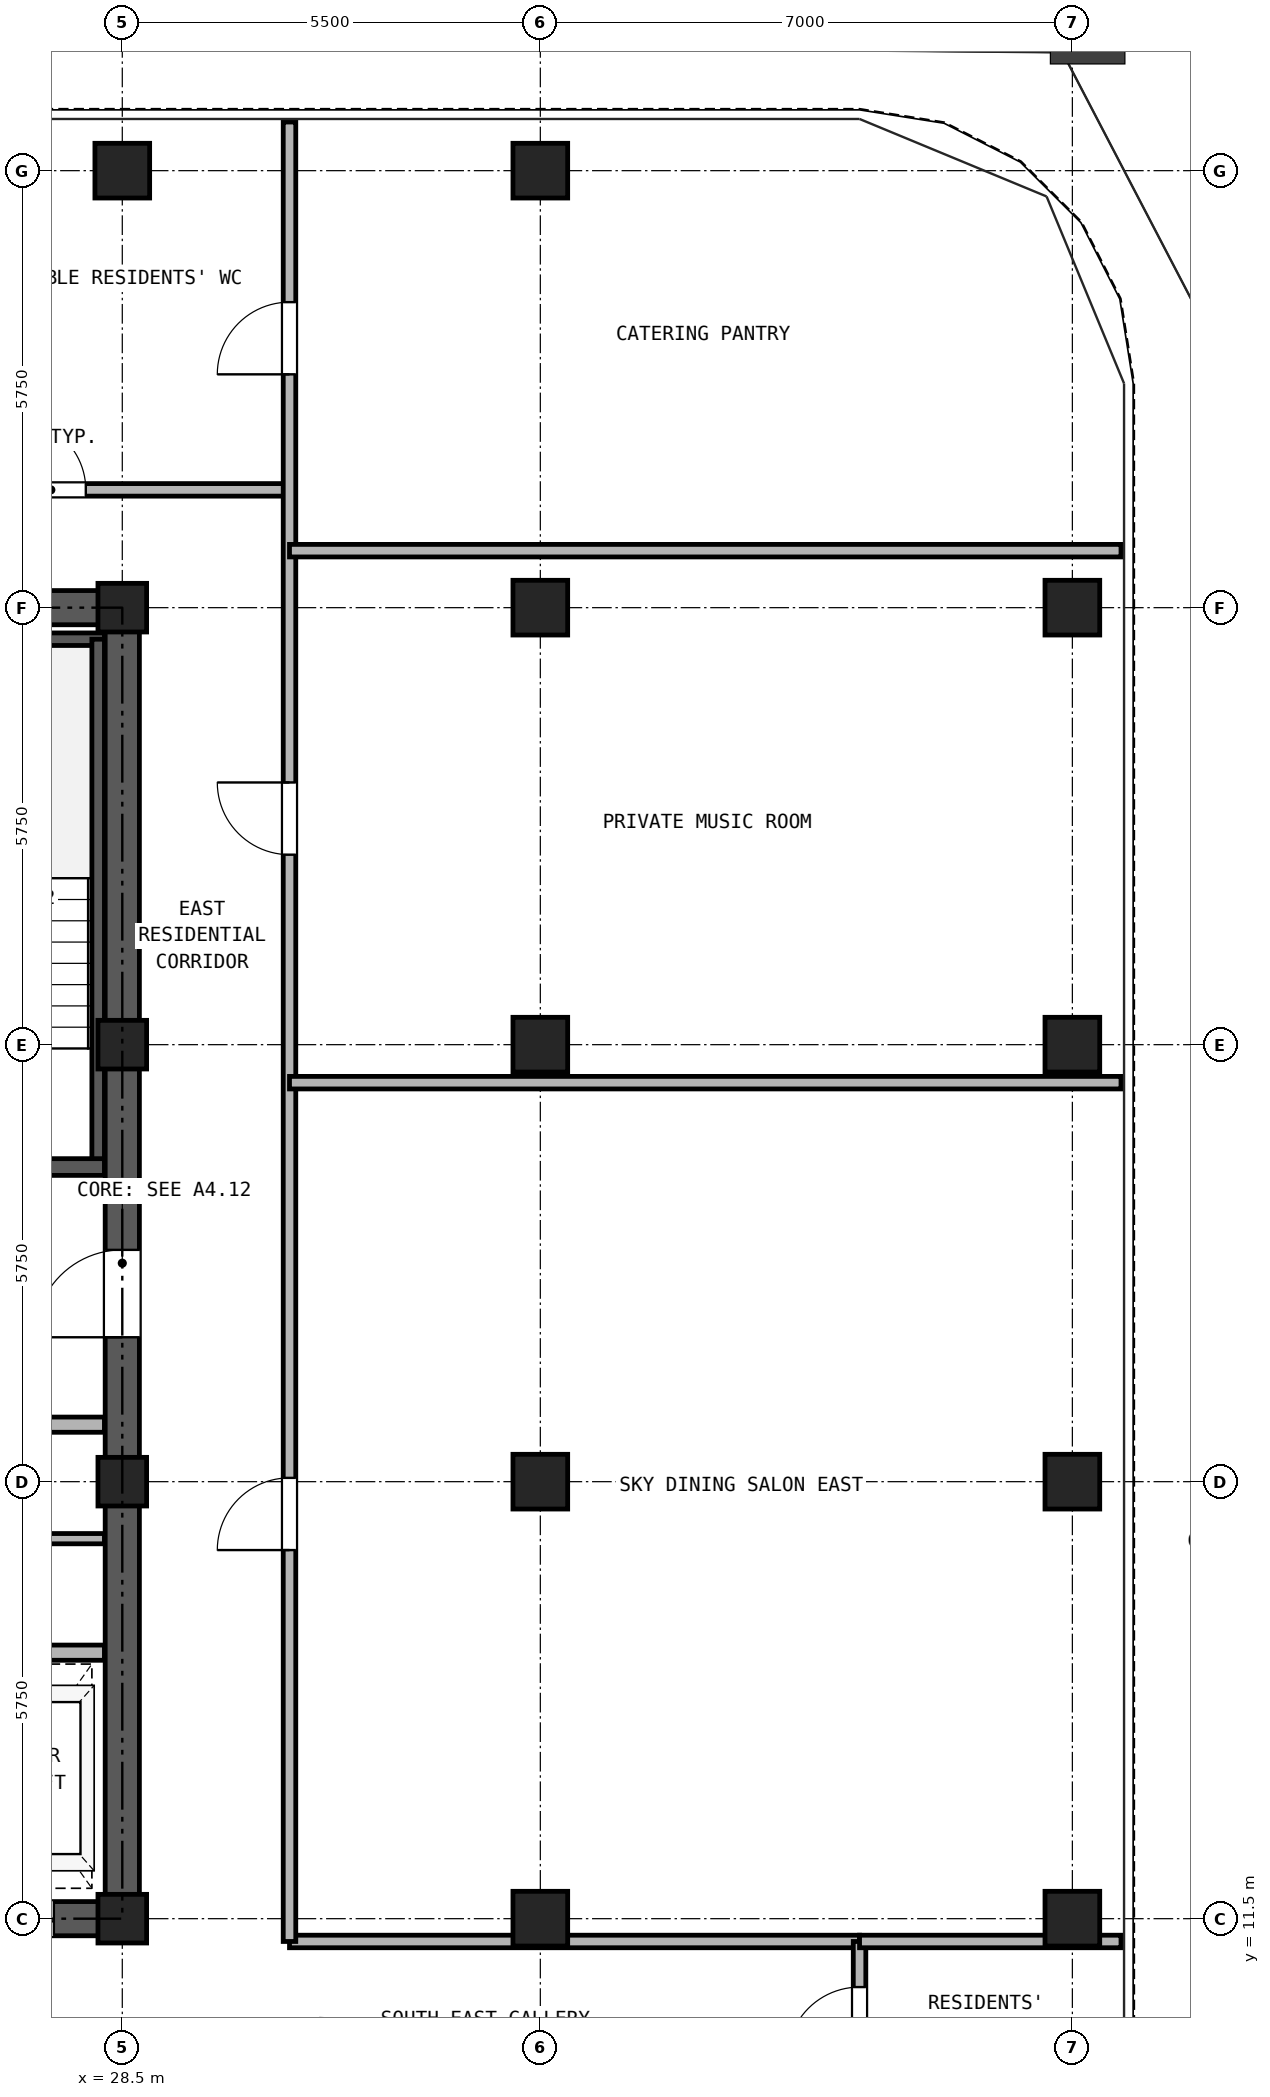
"""IFC4 building model, lengths in metres.
Left out: names, types, materials, properties, quantities, classifications, styles, units other than length and angle.
Written with IfcOpenShell. Run it as: python <this file> out.ifc"""

import sys

from ifc_helpers import new_model, si_unit, direction, frame, frame_2d, origin, origin_2d, place, context, subcontext, project, spatial, rectangle, hollow_rectangle, extrude, source, transform, mapped, element, fill, save


model = new_model("IFC4")
c1 = context("Model", 3, precision=1e-05, world=origin(), true_north=direction((0.0, 1.0)))
c2 = subcontext(c1, "Body", "Model", "MODEL_VIEW")
j1 = project(units=[si_unit("LENGTHUNIT", "METRE"), si_unit("PLANEANGLEUNIT", "RADIAN")], contexts=[c1])
p1 = place(None, origin())
s1 = spatial("IfcSite", under=j1, at=p1, CompositionType="ELEMENT")
p2 = place(p1, origin())
s2 = spatial("IfcBuilding", under=s1, at=p2, CompositionType="ELEMENT")
p3 = place(p2, frame((0.0, 0.0, 181.7)))
s3 = spatial("IfcBuildingStorey", under=s2, at=p3, CompositionType="ELEMENT", Elevation=181.7)
m1 = source(origin(), c2, "Body", "SweptSolid", [
    extrude(hollow_rectangle(XDim=0.72, YDim=0.72, WallThickness=0.04, at=origin_2d()), origin(), (0.0, 0.0, 1.0), 2.95),
])
for number, where, z_axis, x_axis in (
    (1, (28.5, 34.5, 0.0), (0.0, 0.0, 1.0), (1.0, 0.0, 0.0)),
    (2, (34.0, 34.5, 0.0), (0.0, 0.0, 1.0), (1.0, 0.0, 0.0)),
    (3, (41.0, 11.5, 0.0), (0.0, 0.0, 1.0), (1.0, 0.0, 0.0)),
    (4, (41.0, 17.25, 0.0), (0.0, 0.0, 1.0), (1.0, 0.0, 0.0)),
    (5, (41.0, 23.0, 0.0), (0.0, 0.0, 1.0), (1.0, 0.0, 0.0)),
    (6, (41.0, 28.75, 0.0), (0.0, 0.0, 1.0), (1.0, 0.0, 0.0)),
):
    element("IfcColumn", number, at=place(p3, frame(where, z_axis=z_axis, x_axis=x_axis)), inside=s3, PredefinedType="COLUMN", context=c2, shape_type="MappedRepresentation", body=[
        mapped(m1, transform((0.0, 0.0, 0.0), x_axis=(1.0, 0.0, 0.0), y_axis=(0.0, 1.0, 0.0), z_axis=(0.0, 0.0, 1.0), scale=1.0)),
    ])
m2 = source(origin(), c2, "Body", "SweptSolid", [
    extrude(hollow_rectangle(XDim=0.64, YDim=0.64, WallThickness=0.035, at=origin_2d()), origin(), (0.0, 0.0, 1.0), 2.95),
])
for number, where, z_axis, x_axis in (
    (7, (28.5, 11.5, 0.0), (0.0, 0.0, 1.0), (1.0, 0.0, 0.0)),
    (8, (28.5, 17.25, 0.0), (0.0, 0.0, 1.0), (1.0, 0.0, 0.0)),
    (9, (28.5, 23.0, 0.0), (0.0, 0.0, 1.0), (1.0, 0.0, 0.0)),
    (10, (28.5, 28.75, 0.0), (0.0, 0.0, 1.0), (1.0, 0.0, 0.0)),
):
    element("IfcColumn", number, at=place(p3, frame(where, z_axis=z_axis, x_axis=x_axis)), inside=s3, PredefinedType="COLUMN", context=c2, shape_type="MappedRepresentation", body=[
        mapped(m2, transform((0.0, 0.0, 0.0), x_axis=(1.0, 0.0, 0.0), y_axis=(0.0, 1.0, 0.0), z_axis=(0.0, 0.0, 1.0), scale=1.0)),
    ])
for number, where, z_axis, x_axis in (
    (11, (34.0, 11.5, 0.0), (0.0, 0.0, 1.0), (1.0, 0.0, 0.0)),
    (12, (34.0, 17.25, 0.0), (0.0, 0.0, 1.0), (1.0, 0.0, 0.0)),
    (13, (34.0, 23.0, 0.0), (0.0, 0.0, 1.0), (1.0, 0.0, 0.0)),
    (14, (34.0, 28.75, 0.0), (0.0, 0.0, 1.0), (1.0, 0.0, 0.0)),
):
    element("IfcColumn", number, at=place(p3, frame(where, z_axis=z_axis, x_axis=x_axis)), inside=s3, PredefinedType="COLUMN", context=c2, shape_type="MappedRepresentation", body=[
        mapped(m1, transform((0.0, 0.0, 0.0), x_axis=(1.0, 0.0, 0.0), y_axis=(0.0, 1.0, 0.0), z_axis=(0.0, 0.0, 1.0), scale=1.0)),
    ])
p4 = place(p3, frame((18.275, 11.5, 0.0), z_axis=(0.0, 0.0, 1.0), x_axis=(1.0, 0.0, 0.0)))
e15 = element("IfcWall", 15, at=p4, inside=s3, PredefinedType="SHEAR", context=c2, shape_type="SweptSolid", body=[
    extrude(rectangle(XDim=10.45, YDim=0.45, at=frame_2d((5.225, 0.0))), origin(), (0.0, 0.0, 1.0), 2.95),
])
p5 = place(p4, frame((1.825, 0.0, 0.0)))
e16 = element("IfcOpeningElement", 16, at=p5, cuts=e15, PredefinedType="OPENING", context=c2, shape_type="SweptSolid", body=[
    extrude(rectangle(XDim=0.95, YDim=2.15, at=frame_2d((0.475, 1.075))), frame((0.0, 0.235, 0.0), z_axis=(0.0, -1.0, 0.0), x_axis=(1.0, 0.0, 0.0)), (0.0, 0.0, 1.0), 0.47),
])
p6 = place(p4, frame((5.325, 0.0, 0.0)))
e17 = element("IfcOpeningElement", 17, at=p6, cuts=e15, PredefinedType="OPENING", context=c2, shape_type="SweptSolid", body=[
    extrude(rectangle(XDim=0.95, YDim=2.15, at=frame_2d((0.475, 1.075))), frame((0.0, 0.235, 0.0), z_axis=(0.0, -1.0, 0.0), x_axis=(1.0, 0.0, 0.0)), (0.0, 0.0, 1.0), 0.47),
])
p7 = place(p4, frame((8.225, 0.0, 0.0)))
e18 = element("IfcOpeningElement", 18, at=p7, cuts=e15, PredefinedType="OPENING", context=c2, shape_type="SweptSolid", body=[
    extrude(rectangle(XDim=1.1, YDim=2.25, at=frame_2d((0.55, 1.125))), frame((0.0, 0.235, 0.0), z_axis=(0.0, -1.0, 0.0), x_axis=(1.0, 0.0, 0.0)), (0.0, 0.0, 1.0), 0.47),
])
p8 = place(p3, frame((18.275, 28.75, 0.0), z_axis=(0.0, 0.0, 1.0), x_axis=(1.0, 0.0, 0.0)))
e19 = element("IfcWall", 19, at=p8, inside=s3, PredefinedType="SHEAR", context=c2, shape_type="SweptSolid", body=[
    extrude(rectangle(XDim=10.45, YDim=0.45, at=frame_2d((5.225, 0.0))), origin(), (0.0, 0.0, 1.0), 2.95),
])
p9 = place(p8, frame((4.105, 0.0, 0.0)))
e20 = element("IfcOpeningElement", 20, at=p9, cuts=e19, PredefinedType="OPENING", context=c2, shape_type="SweptSolid", body=[
    extrude(rectangle(XDim=0.9, YDim=2.05, at=frame_2d((0.45, 1.025))), frame((0.0, 0.235, 0.0), z_axis=(0.0, -1.0, 0.0), x_axis=(1.0, 0.0, 0.0)), (0.0, 0.0, 1.0), 0.47),
])
p10 = place(p8, frame((5.645, 0.0, 0.0)))
e21 = element("IfcOpeningElement", 21, at=p10, cuts=e19, PredefinedType="OPENING", context=c2, shape_type="SweptSolid", body=[
    extrude(rectangle(XDim=0.9, YDim=2.05, at=frame_2d((0.45, 1.025))), frame((0.0, 0.235, 0.0), z_axis=(0.0, -1.0, 0.0), x_axis=(1.0, 0.0, 0.0)), (0.0, 0.0, 1.0), 0.47),
])
p11 = place(p3, frame((28.5, 11.725, 0.0), z_axis=(0.0, 0.0, 1.0), x_axis=(0.0, 1.0, 0.0)))
e22 = element("IfcWall", 22, at=p11, inside=s3, PredefinedType="SHEAR", context=c2, shape_type="SweptSolid", body=[
    extrude(rectangle(XDim=16.8, YDim=0.45, at=frame_2d((8.4, 0.0))), origin(), (0.0, 0.0, 1.0), 2.95),
])
p12 = place(p11, frame((7.425, 0.0, 0.0)))
e23 = element("IfcOpeningElement", 23, at=p12, cuts=e22, PredefinedType="OPENING", context=c2, shape_type="SweptSolid", body=[
    extrude(rectangle(XDim=1.15, YDim=2.2, at=frame_2d((0.575, 1.1))), frame((0.0, 0.235, 0.0), z_axis=(0.0, -1.0, 0.0), x_axis=(1.0, 0.0, 0.0)), (0.0, 0.0, 1.0), 0.47),
])
p13 = place(p3, frame((25.13, 28.335, 0.0), z_axis=(0.0, 0.0, 1.0), x_axis=(1.0, 0.0, 0.0)))
e24 = element("IfcWall", 24, at=p13, inside=s3, PredefinedType="PARTITIONING", context=c2, shape_type="SweptSolid", body=[
    extrude(rectangle(XDim=3.135, YDim=0.165, at=frame_2d((1.567, 0.0))), origin(), (0.0, 0.0, 1.0), 2.95),
])
p14 = place(p3, frame((28.183, 21.39, 0.0), z_axis=(0.0, 0.0, 1.0), x_axis=(0.0, 1.0, 0.0)))
e25 = element("IfcWall", 25, at=p14, inside=s3, PredefinedType="PARTITIONING", context=c2, shape_type="SweptSolid", body=[
    extrude(rectangle(XDim=6.945, YDim=0.165, at=frame_2d((3.473, 0.0))), origin(), (0.0, 0.0, 1.0), 2.95),
])
p15 = place(p3, frame((25.13, 21.39, 0.0), z_axis=(0.0, 0.0, 1.0), x_axis=(1.0, 0.0, 0.0)))
e26 = element("IfcWall", 26, at=p15, inside=s3, PredefinedType="SOLIDWALL", context=c2, shape_type="SweptSolid", body=[
    extrude(rectangle(XDim=3.135, YDim=0.22, at=frame_2d((1.567, 0.0))), origin(), (0.0, 0.0, 1.0), 2.95),
])
p16 = place(p15, frame((0.92, 0.0, 0.0)))
e27 = element("IfcOpeningElement", 27, at=p16, cuts=e26, PredefinedType="OPENING", context=c2, shape_type="SweptSolid", body=[
    extrude(rectangle(XDim=1.15, YDim=2.2, at=frame_2d((0.575, 1.1))), frame((0.0, 0.12, 0.0), z_axis=(0.0, -1.0, 0.0), x_axis=(1.0, 0.0, 0.0)), (0.0, 0.0, 1.0), 0.24),
])
p17 = place(p3, frame((18.735, 18.0, 0.0), z_axis=(0.0, 0.0, 1.0), x_axis=(1.0, 0.0, 0.0)))
e28 = element("IfcWall", 28, at=p17, inside=s3, PredefinedType="PARTITIONING", context=c2, shape_type="SweptSolid", body=[
    extrude(rectangle(XDim=9.53, YDim=0.2, at=frame_2d((4.765, 0.0))), origin(), (0.0, 0.0, 1.0), 2.95),
])
p18 = place(p17, frame((0.515, 0.0, 0.0)))
e29 = element("IfcOpeningElement", 29, at=p18, cuts=e28, PredefinedType="OPENING", context=c2, shape_type="SweptSolid", body=[
    extrude(rectangle(XDim=1.3, YDim=2.3, at=frame_2d((0.65, 1.15))), frame((0.0, 0.11, 0.0), z_axis=(0.0, -1.0, 0.0), x_axis=(1.0, 0.0, 0.0)), (0.0, 0.0, 1.0), 0.22),
])
p19 = place(p17, frame((2.615, 0.0, 0.0)))
e30 = element("IfcOpeningElement", 30, at=p19, cuts=e28, PredefinedType="OPENING", context=c2, shape_type="SweptSolid", body=[
    extrude(rectangle(XDim=1.3, YDim=2.3, at=frame_2d((0.65, 1.15))), frame((0.0, 0.11, 0.0), z_axis=(0.0, -1.0, 0.0), x_axis=(1.0, 0.0, 0.0)), (0.0, 0.0, 1.0), 0.22),
])
p20 = place(p17, frame((7.115, 0.0, 0.0)))
e31 = element("IfcOpeningElement", 31, at=p20, cuts=e28, PredefinedType="OPENING", context=c2, shape_type="SweptSolid", body=[
    extrude(rectangle(XDim=1.0, YDim=2.15, at=frame_2d((0.5, 1.075))), frame((0.0, 0.11, 0.0), z_axis=(0.0, -1.0, 0.0), x_axis=(1.0, 0.0, 0.0)), (0.0, 0.0, 1.0), 0.22),
])
p21 = place(p3, frame((18.735, 15.0, 0.0), z_axis=(0.0, 0.0, 1.0), x_axis=(1.0, 0.0, 0.0)))
e32 = element("IfcWall", 32, at=p21, inside=s3, PredefinedType="PARTITIONING", context=c2, shape_type="SweptSolid", body=[
    extrude(rectangle(XDim=9.53, YDim=0.2, at=frame_2d((4.765, 0.0))), origin(), (0.0, 0.0, 1.0), 2.95),
])
p22 = place(p3, frame((23.3, 16.5, 0.0), z_axis=(0.0, 0.0, 1.0), x_axis=(1.0, 0.0, 0.0)))
e33 = element("IfcWall", 33, at=p22, inside=s3, PredefinedType="PARTITIONING", context=c2, shape_type="SweptSolid", body=[
    extrude(rectangle(XDim=4.965, YDim=0.135, at=frame_2d((2.482, 0.0))), origin(), (0.0, 0.0, 1.0), 2.95),
])
p23 = place(p22, frame((2.55, 0.0, 0.0)))
e34 = element("IfcOpeningElement", 34, at=p23, cuts=e33, PredefinedType="OPENING", context=c2, shape_type="SweptSolid", body=[
    extrude(rectangle(XDim=0.9, YDim=2.05, at=frame_2d((0.45, 1.025))), frame((0.0, 0.077, 0.0), z_axis=(0.0, -1.0, 0.0), x_axis=(1.0, 0.0, 0.0)), (0.0, 0.0, 1.0), 0.155),
])
p24 = place(p3, frame((30.7, 11.2, 0.0), z_axis=(0.0, 0.0, 1.0), x_axis=(1.0, 0.0, 0.0)))
e35 = element("IfcWall", 35, at=p24, inside=s3, PredefinedType="PARTITIONING", context=c2, shape_type="SweptSolid", body=[
    extrude(rectangle(XDim=7.5, YDim=0.165, at=frame_2d((3.75, 0.0))), origin(), (0.0, 0.0, 1.0), 2.95),
])
p25 = place(p3, frame((38.2, 9.2, 0.0), z_axis=(0.0, 0.0, 1.0), x_axis=(0.0, 1.0, 0.0)))
e36 = element("IfcWall", 36, at=p25, inside=s3, PredefinedType="PARTITIONING", context=c2, shape_type="SweptSolid", body=[
    extrude(rectangle(XDim=2.0, YDim=0.165, at=frame_2d((1.0, 0.0))), origin(), (0.0, 0.0, 1.0), 2.95),
])
p26 = place(p25, frame((0.45, 0.0, 0.0)))
e37 = element("IfcOpeningElement", 37, at=p26, cuts=e36, PredefinedType="OPENING", context=c2, shape_type="SweptSolid", body=[
    extrude(rectangle(XDim=0.95, YDim=2.15, at=frame_2d((0.475, 1.075))), frame((0.0, 0.093, 0.0), z_axis=(0.0, -1.0, 0.0), x_axis=(1.0, 0.0, 0.0)), (0.0, 0.0, 1.0), 0.185),
])
p27 = place(p3, frame((16.3, 30.3, 0.0), z_axis=(0.0, 0.0, 1.0), x_axis=(1.0, 0.0, 0.0)))
e38 = element("IfcWall", 38, at=p27, inside=s3, PredefinedType="PARTITIONING", context=c2, shape_type="SweptSolid", body=[
    extrude(rectangle(XDim=14.4, YDim=0.165, at=frame_2d((7.2, 0.0))), origin(), (0.0, 0.0, 1.0), 2.95),
])
p28 = place(p27, frame((3.1, 0.0, 0.0)))
e39 = element("IfcOpeningElement", 39, at=p28, cuts=e38, PredefinedType="OPENING", context=c2, shape_type="SweptSolid", body=[
    extrude(rectangle(XDim=0.95, YDim=2.15, at=frame_2d((0.475, 1.075))), frame((0.0, 0.093, 0.0), z_axis=(0.0, -1.0, 0.0), x_axis=(1.0, 0.0, 0.0)), (0.0, 0.0, 1.0), 0.185),
])
p29 = place(p27, frame((8.0, 0.0, 0.0)))
e40 = element("IfcOpeningElement", 40, at=p29, cuts=e38, PredefinedType="OPENING", context=c2, shape_type="SweptSolid", body=[
    extrude(rectangle(XDim=0.95, YDim=2.15, at=frame_2d((0.475, 1.075))), frame((0.0, 0.093, 0.0), z_axis=(0.0, -1.0, 0.0), x_axis=(1.0, 0.0, 0.0)), (0.0, 0.0, 1.0), 0.185),
])
p30 = place(p27, frame((10.8, 0.0, 0.0)))
e41 = element("IfcOpeningElement", 41, at=p30, cuts=e38, PredefinedType="OPENING", context=c2, shape_type="SweptSolid", body=[
    extrude(rectangle(XDim=0.92, YDim=2.1, at=frame_2d((0.46, 1.05))), frame((0.0, 0.093, 0.0), z_axis=(0.0, -1.0, 0.0), x_axis=(1.0, 0.0, 0.0)), (0.0, 0.0, 1.0), 0.185),
])
p31 = place(p3, frame((30.7, 11.2, 0.0), z_axis=(0.0, 0.0, 1.0), x_axis=(0.0, 1.0, 0.0)))
e42 = element("IfcWall", 42, at=p31, inside=s3, PredefinedType="PARTITIONING", context=c2, shape_type="SweptSolid", body=[
    extrude(rectangle(XDim=23.94, YDim=0.165, at=frame_2d((11.97, 0.0))), origin(), (0.0, 0.0, 1.0), 2.95),
])
p32 = place(p31, frame((5.15, 0.0, 0.0)))
e43 = element("IfcOpeningElement", 43, at=p32, cuts=e42, PredefinedType="OPENING", context=c2, shape_type="SweptSolid", body=[
    extrude(rectangle(XDim=0.95, YDim=2.15, at=frame_2d((0.475, 1.075))), frame((0.0, 0.093, 0.0), z_axis=(0.0, -1.0, 0.0), x_axis=(1.0, 0.0, 0.0)), (0.0, 0.0, 1.0), 0.185),
])
p33 = place(p31, frame((14.3, 0.0, 0.0)))
e44 = element("IfcOpeningElement", 44, at=p33, cuts=e42, PredefinedType="OPENING", context=c2, shape_type="SweptSolid", body=[
    extrude(rectangle(XDim=0.95, YDim=2.15, at=frame_2d((0.475, 1.075))), frame((0.0, 0.093, 0.0), z_axis=(0.0, -1.0, 0.0), x_axis=(1.0, 0.0, 0.0)), (0.0, 0.0, 1.0), 0.185),
])
p34 = place(p31, frame((20.62, 0.0, 0.0)))
e45 = element("IfcOpeningElement", 45, at=p34, cuts=e42, PredefinedType="OPENING", context=c2, shape_type="SweptSolid", body=[
    extrude(rectangle(XDim=0.95, YDim=2.15, at=frame_2d((0.475, 1.075))), frame((0.0, 0.093, 0.0), z_axis=(0.0, -1.0, 0.0), x_axis=(1.0, 0.0, 0.0)), (0.0, 0.0, 1.0), 0.185),
])
p35 = place(p3, frame((38.2, 11.2, 0.0), z_axis=(0.0, 0.0, 1.0), x_axis=(1.0, 0.0, 0.0)))
e46 = element("IfcWall", 46, at=p35, inside=s3, PredefinedType="PARTITIONING", context=c2, shape_type="SweptSolid", body=[
    extrude(rectangle(XDim=3.44, YDim=0.165, at=frame_2d((1.72, 0.0))), origin(), (0.0, 0.0, 1.0), 2.95),
])
for number, where, z_axis, x_axis in (
    (47, (30.7, 22.5, 0.0), (0.0, 0.0, 1.0), (1.0, 0.0, 0.0)),
    (48, (30.7, 29.5, 0.0), (0.0, 0.0, 1.0), (1.0, 0.0, 0.0)),
):
    element("IfcWall", number, at=place(p3, frame(where, z_axis=z_axis, x_axis=x_axis)), inside=s3, PredefinedType="PARTITIONING", context=c2, shape_type="SweptSolid", body=[
        extrude(rectangle(XDim=10.94, YDim=0.165, at=frame_2d((5.47, 0.0))), origin(), (0.0, 0.0, 1.0), 2.95),
    ])
p36 = place(p12, origin())
e49 = element("IfcDoor", 49, at=p36, inside=s3, OperationType="SINGLE_SWING_LEFT", PredefinedType="DOOR", context=c2, shape_type="SweptSolid", body=[
    extrude(rectangle(XDim=1.15, YDim=2.2, at=frame_2d((0.575, 1.1))), frame((0.0, 0.025, 0.0), z_axis=(0.0, -1.0, 0.0), x_axis=(1.0, 0.0, 0.0)), (0.0, 0.0, 1.0), 0.05),
])
fill(e23, e49)
p37 = place(p7, frame((1.1, 0.0, 0.0), z_axis=(0.0, 0.0, 1.0), x_axis=(-1.0, 0.0, 0.0)))
e50 = element("IfcDoor", 50, at=p37, inside=s3, OperationType="DOUBLE_DOOR_SLIDING", PredefinedType="DOOR", context=c2, shape_type="SweptSolid", body=[
    extrude(rectangle(XDim=1.1, YDim=2.25, at=frame_2d((0.55, 1.125))), frame((0.0, 0.025, 0.0), z_axis=(0.0, -1.0, 0.0), x_axis=(1.0, 0.0, 0.0)), (0.0, 0.0, 1.0), 0.05),
])
fill(e18, e50)
p38 = place(p26, origin())
e51 = element("IfcDoor", 51, at=p38, inside=s3, OperationType="SINGLE_SWING_LEFT", PredefinedType="DOOR", context=c2, shape_type="SweptSolid", body=[
    extrude(rectangle(XDim=0.95, YDim=2.15, at=frame_2d((0.475, 1.075))), frame((0.0, 0.025, 0.0), z_axis=(0.0, -1.0, 0.0), x_axis=(1.0, 0.0, 0.0)), (0.0, 0.0, 1.0), 0.05),
])
fill(e37, e51)
p39 = place(p32, origin())
e52 = element("IfcDoor", 52, at=p39, inside=s3, OperationType="SINGLE_SWING_LEFT", PredefinedType="DOOR", context=c2, shape_type="SweptSolid", body=[
    extrude(rectangle(XDim=0.95, YDim=2.15, at=frame_2d((0.475, 1.075))), frame((0.0, 0.025, 0.0), z_axis=(0.0, -1.0, 0.0), x_axis=(1.0, 0.0, 0.0)), (0.0, 0.0, 1.0), 0.05),
])
fill(e43, e52)
p40 = place(p33, origin())
e53 = element("IfcDoor", 53, at=p40, inside=s3, OperationType="SINGLE_SWING_RIGHT", PredefinedType="DOOR", context=c2, shape_type="SweptSolid", body=[
    extrude(rectangle(XDim=0.95, YDim=2.15, at=frame_2d((0.475, 1.075))), frame((0.0, 0.025, 0.0), z_axis=(0.0, -1.0, 0.0), x_axis=(1.0, 0.0, 0.0)), (0.0, 0.0, 1.0), 0.05),
])
fill(e44, e53)
p41 = place(p34, origin())
e54 = element("IfcDoor", 54, at=p41, inside=s3, OperationType="SINGLE_SWING_LEFT", PredefinedType="DOOR", context=c2, shape_type="SweptSolid", body=[
    extrude(rectangle(XDim=0.95, YDim=2.15, at=frame_2d((0.475, 1.075))), frame((0.0, 0.025, 0.0), z_axis=(0.0, -1.0, 0.0), x_axis=(1.0, 0.0, 0.0)), (0.0, 0.0, 1.0), 0.05),
])
fill(e45, e54)
p42 = place(p30, origin())
e55 = element("IfcDoor", 55, at=p42, inside=s3, OperationType="SINGLE_SWING_LEFT", PredefinedType="DOOR", context=c2, shape_type="SweptSolid", body=[
    extrude(rectangle(XDim=0.92, YDim=2.1, at=frame_2d((0.46, 1.05))), frame((0.0, 0.025, 0.0), z_axis=(0.0, -1.0, 0.0), x_axis=(1.0, 0.0, 0.0)), (0.0, 0.0, 1.0), 0.05),
])
fill(e41, e55)
save(model, sys.argv[1])
